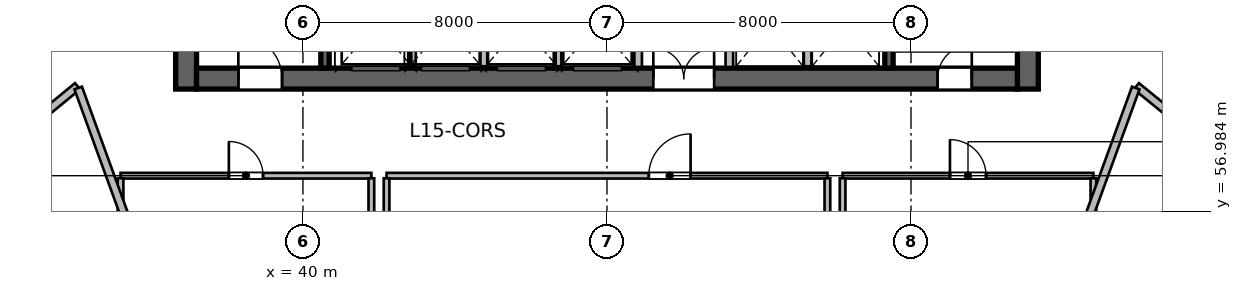
"""IFC4 building model, lengths in metres.
Left out: names, types, materials, properties, quantities, classifications, styles, units other than length and angle.
Written with IfcOpenShell. Run it as: python <this file> out.ifc"""

import sys

from ifc_helpers import new_model, si_unit, direction, frame, frame_2d, origin, place, context, subcontext, project, spatial, rectangle, extrude, source, transform, mapped, element, fill, save


model = new_model("IFC4")
c1 = context("Model", 3, precision=1e-05, world=origin(), true_north=direction((0.0, 1.0)))
c2 = subcontext(c1, "Body", "Model", "MODEL_VIEW")
j1 = project(units=[si_unit("LENGTHUNIT", "METRE"), si_unit("PLANEANGLEUNIT", "RADIAN")], contexts=[c1])
p1 = place(None, origin())
s1 = spatial("IfcSite", under=j1, at=p1, CompositionType="ELEMENT")
p2 = place(p1, origin())
s2 = spatial("IfcBuilding", under=s1, at=p2, CompositionType="ELEMENT")
p3 = place(p2, frame((0.0, 0.0, 67.8)))
s3 = spatial("IfcBuildingStorey", under=s2, at=p3, CompositionType="ELEMENT", Elevation=67.8)
m1 = source(origin(), c2, "Body", "SweptSolid", [
    extrude(rectangle(XDim=12.0, YDim=0.55, at=frame_2d((6.0, 0.0))), origin(), (0.0, 0.0, 1.0), 3.6),
])
for number, where, z_axis, x_axis in (
    (1, (36.925, 60.2, 0.0), (0.0, 0.0, 1.0), (0.0, 1.0, 0.0)),
    (2, (59.075, 60.2, 0.0), (0.0, 0.0, 1.0), (0.0, 1.0, 0.0)),
):
    element("IfcWall", number, at=place(p3, frame(where, z_axis=z_axis, x_axis=x_axis)), inside=s3, PredefinedType="SHEAR", context=c2, shape_type="MappedRepresentation", body=[
        mapped(m1, transform((0.0, 0.0, 0.0), scale=1.0)),
    ])
m2 = source(origin(), c2, "Body", "SweptSolid", [
    extrude(rectangle(XDim=21.6, YDim=0.55, at=frame_2d((10.8, 0.0))), origin(), (0.0, 0.0, 1.0), 3.6),
])
p4 = place(p3, frame((37.2, 60.475, 0.0), z_axis=(0.0, 0.0, 1.0), x_axis=(1.0, 0.0, 0.0)))
e3 = element("IfcWall", 3, at=p4, inside=s3, PredefinedType="SHEAR", context=c2, shape_type="MappedRepresentation", body=[
    mapped(m2, transform((0.0, 0.0, 0.0), scale=1.0)),
])
p5 = place(p4, frame((1.1, 0.0, 0.0)))
e4 = element("IfcOpeningElement", 4, at=p5, cuts=e3, PredefinedType="OPENING", context=c2, shape_type="SweptSolid", body=[
    extrude(rectangle(XDim=1.15, YDim=2.15, at=frame_2d((0.575, 1.075))), frame((0.0, 0.285, 0.0), z_axis=(0.0, -1.0, 0.0), x_axis=(1.0, 0.0, 0.0)), (0.0, 0.0, 1.0), 0.57),
])
p6 = place(p4, frame((19.5, 0.0, 0.0)))
e5 = element("IfcOpeningElement", 5, at=p6, cuts=e3, PredefinedType="OPENING", context=c2, shape_type="SweptSolid", body=[
    extrude(rectangle(XDim=0.9, YDim=2.1, at=frame_2d((0.45, 1.05))), frame((0.0, 0.285, 0.0), z_axis=(0.0, -1.0, 0.0), x_axis=(1.0, 0.0, 0.0)), (0.0, 0.0, 1.0), 0.57),
])
p7 = place(p4, frame((12.02, 0.0, 0.0)))
e6 = element("IfcOpeningElement", 6, at=p7, cuts=e3, PredefinedType="OPENING", context=c2, shape_type="SweptSolid", body=[
    extrude(rectangle(XDim=1.6, YDim=2.15, at=frame_2d((0.8, 1.075))), frame((0.0, 0.285, 0.0), z_axis=(0.0, -1.0, 0.0), x_axis=(1.0, 0.0, 0.0)), (0.0, 0.0, 1.0), 0.57),
])
m3 = source(origin(), c2, "Body", "SweptSolid", [
    extrude(rectangle(XDim=10.9, YDim=0.22, at=frame_2d((5.45, 0.0))), origin(), (0.0, 0.0, 1.0), 3.6),
])
p8 = place(p3, frame((40.58, 60.75, 0.0), z_axis=(0.0, 0.0, 1.0), x_axis=(0.0, 1.0, 0.0)))
e7 = element("IfcWall", 7, at=p8, inside=s3, PredefinedType="SHEAR", context=c2, shape_type="MappedRepresentation", body=[
    mapped(m3, transform((0.0, 0.0, 0.0), scale=1.0)),
])
p9 = place(p3, frame((55.42, 60.75, 0.0), z_axis=(0.0, 0.0, 1.0), x_axis=(0.0, 1.0, 0.0)))
e8 = element("IfcWall", 8, at=p9, inside=s3, PredefinedType="SHEAR", context=c2, shape_type="MappedRepresentation", body=[
    mapped(m3, transform((0.0, 0.0, 0.0), scale=1.0)),
])
p10 = place(p9, frame((9.495, 0.0, 0.0)))
e9 = element("IfcOpeningElement", 9, at=p10, cuts=e8, PredefinedType="OPENING", context=c2, shape_type="SweptSolid", body=[
    extrude(rectangle(XDim=1.15, YDim=2.15, at=frame_2d((0.575, 1.075))), frame((0.0, 0.12, 0.0), z_axis=(0.0, -1.0, 0.0), x_axis=(1.0, 0.0, 0.0)), (0.0, 0.0, 1.0), 0.24),
])
m4 = source(origin(), c2, "Body", "SweptSolid", [
    extrude(rectangle(XDim=2.24, YDim=0.2, at=frame_2d((1.12, 0.0))), origin(), (0.0, 0.0, 1.0), 3.36),
])
for number, where, z_axis, x_axis in (
    (10, (48.82, 60.78, 0.0), (0.0, 0.0, 1.0), (0.0, 1.0, 0.0)),
    (11, (51.22, 60.78, 0.0), (0.0, 0.0, 1.0), (0.0, 1.0, 0.0)),
):
    element("IfcWall", number, at=place(p3, frame(where, z_axis=z_axis, x_axis=x_axis)), inside=s3, PredefinedType="SOLIDWALL", context=c2, shape_type="MappedRepresentation", body=[
        mapped(m4, transform((0.0, 0.0, 0.0), scale=1.0)),
    ])
m5 = source(origin(), c2, "Body", "SweptSolid", [
    extrude(rectangle(XDim=2.2, YDim=0.2, at=frame_2d((1.1, 0.0))), origin(), (0.0, 0.0, 1.0), 3.36),
])
for number, where, z_axis, x_axis in (
    (12, (42.87, 60.8, 0.0), (0.0, 0.0, 1.0), (0.0, 1.0, 0.0)),
    (13, (44.77, 60.8, 0.0), (0.0, 0.0, 1.0), (0.0, 1.0, 0.0)),
    (14, (46.7, 60.8, 0.0), (0.0, 0.0, 1.0), (0.0, 1.0, 0.0)),
    (15, (53.28, 60.8, 0.0), (0.0, 0.0, 1.0), (0.0, 1.0, 0.0)),
):
    element("IfcWall", number, at=place(p3, frame(where, z_axis=z_axis, x_axis=x_axis)), inside=s3, PredefinedType="SOLIDWALL", context=c2, shape_type="MappedRepresentation", body=[
        mapped(m5, transform((0.0, 0.0, 0.0), scale=1.0)),
    ])
m6 = source(origin(), c2, "Body", "SweptSolid", [
    extrude(rectangle(XDim=6.6, YDim=0.15, at=frame_2d((3.3, 0.0))), origin(), (0.0, 0.0, 1.0), 3.36),
])
p11 = place(p3, frame((35.2, 57.92, 0.0), z_axis=(0.0, 0.0, 1.0), x_axis=(1.0, 0.0, 0.0)))
e16 = element("IfcWall", 16, at=p11, inside=s3, PredefinedType="PARTITIONING", context=c2, shape_type="MappedRepresentation", body=[
    mapped(m6, transform((0.0, 0.0, 0.0), scale=1.0)),
])
p12 = place(p11, frame((2.85, 0.0, 0.0)))
e17 = element("IfcOpeningElement", 17, at=p12, cuts=e16, PredefinedType="OPENING", context=c2, shape_type="SweptSolid", body=[
    extrude(rectangle(XDim=0.9, YDim=2.1, at=frame_2d((0.45, 1.05))), frame((0.0, 0.085, 0.0), z_axis=(0.0, -1.0, 0.0), x_axis=(1.0, 0.0, 0.0)), (0.0, 0.0, 1.0), 0.17),
])
m7 = source(origin(), c2, "Body", "SweptSolid", [
    extrude(rectangle(XDim=3.785, YDim=0.15, at=frame_2d((1.893, 0.0))), origin(), (0.0, 0.0, 1.0), 3.36),
])
for number, where, z_axis, x_axis in (
    (18, (35.2, 54.067, 0.0), (0.0, 0.0, 1.0), (0.0, 1.0, 0.0)),
    (19, (41.8, 54.067, 0.0), (0.0, 0.0, 1.0), (0.0, 1.0, 0.0)),
):
    element("IfcWall", number, at=place(p3, frame(where, z_axis=z_axis, x_axis=x_axis)), inside=s3, PredefinedType="PARTITIONING", context=c2, shape_type="MappedRepresentation", body=[
        mapped(m7, transform((0.0, 0.0, 0.0), scale=1.0)),
    ])
m8 = source(origin(), c2, "Body", "SweptSolid", [
    extrude(rectangle(XDim=11.6, YDim=0.15, at=frame_2d((5.8, 0.0))), origin(), (0.0, 0.0, 1.0), 3.36),
])
p13 = place(p3, frame((42.2, 57.92, 0.0), z_axis=(0.0, 0.0, 1.0), x_axis=(1.0, 0.0, 0.0)))
e20 = element("IfcWall", 20, at=p13, inside=s3, PredefinedType="PARTITIONING", context=c2, shape_type="MappedRepresentation", body=[
    mapped(m8, transform((0.0, 0.0, 0.0), scale=1.0)),
])
p14 = place(p13, frame((6.9, 0.0, 0.0)))
e21 = element("IfcOpeningElement", 21, at=p14, cuts=e20, PredefinedType="OPENING", context=c2, shape_type="SweptSolid", body=[
    extrude(rectangle(XDim=1.1, YDim=2.15, at=frame_2d((0.55, 1.075))), frame((0.0, 0.085, 0.0), z_axis=(0.0, -1.0, 0.0), x_axis=(1.0, 0.0, 0.0)), (0.0, 0.0, 1.0), 0.17),
])
for number, where, z_axis, x_axis in (
    (22, (42.2, 54.067, 0.0), (0.0, 0.0, 1.0), (0.0, 1.0, 0.0)),
    (23, (53.8, 54.067, 0.0), (0.0, 0.0, 1.0), (0.0, 1.0, 0.0)),
):
    element("IfcWall", number, at=place(p3, frame(where, z_axis=z_axis, x_axis=x_axis)), inside=s3, PredefinedType="PARTITIONING", context=c2, shape_type="MappedRepresentation", body=[
        mapped(m7, transform((0.0, 0.0, 0.0), scale=1.0)),
    ])
p15 = place(p3, frame((54.2, 57.92, 0.0), z_axis=(0.0, 0.0, 1.0), x_axis=(1.0, 0.0, 0.0)))
e24 = element("IfcWall", 24, at=p15, inside=s3, PredefinedType="PARTITIONING", context=c2, shape_type="MappedRepresentation", body=[
    mapped(m6, transform((0.0, 0.0, 0.0), scale=1.0)),
])
p16 = place(p15, frame((2.825, 0.0, 0.0)))
e25 = element("IfcOpeningElement", 25, at=p16, cuts=e24, PredefinedType="OPENING", context=c2, shape_type="SweptSolid", body=[
    extrude(rectangle(XDim=0.95, YDim=2.1, at=frame_2d((0.475, 1.05))), frame((0.0, 0.085, 0.0), z_axis=(0.0, -1.0, 0.0), x_axis=(1.0, 0.0, 0.0)), (0.0, 0.0, 1.0), 0.17),
])
for number, where, z_axis, x_axis in (
    (26, (54.2, 54.067, 0.0), (0.0, 0.0, 1.0), (0.0, 1.0, 0.0)),
    (27, (60.8, 54.067, 0.0), (0.0, 0.0, 1.0), (0.0, 1.0, 0.0)),
):
    element("IfcWall", number, at=place(p3, frame(where, z_axis=z_axis, x_axis=x_axis)), inside=s3, PredefinedType="PARTITIONING", context=c2, shape_type="MappedRepresentation", body=[
        mapped(m7, transform((0.0, 0.0, 0.0), scale=1.0)),
    ])
m9 = source(origin(), c2, "Body", "SweptSolid", [
    extrude(rectangle(XDim=6.721, YDim=0.21, at=frame_2d((3.361, 0.0))), origin(), (0.0, 0.0, 1.0), 3.36),
])
p17 = place(p3, frame((28.874, 56.01, 0.0), z_axis=(0.0, 0.0, 1.0), x_axis=(0.772828051199, 0.63461547671, 0.0)))
e28 = element("IfcWall", 28, at=p17, inside=s3, PredefinedType="PARTITIONING", context=c2, shape_type="MappedRepresentation", body=[
    mapped(m9, transform((0.0, 0.0, 0.0), scale=1.0)),
])
m10 = source(origin(), c2, "Body", "SweptSolid", [
    extrude(rectangle(XDim=12.196, YDim=0.21, at=frame_2d((6.098, 0.0))), origin(), (0.0, 0.0, 1.0), 3.36),
])
p18 = place(p3, frame((38.258, 48.766, 0.0), z_axis=(0.0, 0.0, 1.0), x_axis=(-0.342022711534, 0.939691686031, 0.0)))
e29 = element("IfcWall", 29, at=p18, inside=s3, PredefinedType="PARTITIONING", context=c2, shape_type="MappedRepresentation", body=[
    mapped(m10, transform((0.0, 0.0, 0.0), scale=1.0)),
])
m11 = source(origin(), c2, "Body", "SweptSolid", [
    extrude(rectangle(XDim=6.408, YDim=0.21, at=frame_2d((3.204, 0.0))), origin(), (0.0, 0.0, 1.0), 3.36),
])
p19 = place(p3, frame((61.931, 60.275, 0.0), z_axis=(0.0, 0.0, 1.0), x_axis=(0.775878552904, -0.630882295792, 0.0)))
e30 = element("IfcWall", 30, at=p19, inside=s3, PredefinedType="PARTITIONING", context=c2, shape_type="MappedRepresentation", body=[
    mapped(m11, transform((0.0, 0.0, 0.0), scale=1.0)),
])
p20 = place(p19, frame((1.063, 0.0, 0.0)))
e31 = element("IfcOpeningElement", 31, at=p20, cuts=e30, PredefinedType="OPENING", context=c2, shape_type="SweptSolid", body=[
    extrude(rectangle(XDim=0.95, YDim=2.15, at=frame_2d((0.475, 1.075))), frame((0.0, 0.115, 0.0), z_axis=(0.0, -1.0, 0.0), x_axis=(1.0, 0.0, 0.0)), (0.0, 0.0, 1.0), 0.23),
])
p21 = place(p3, frame((57.742, 48.766, 0.0), z_axis=(0.0, 0.0, 1.0), x_axis=(0.342022711534, 0.939691686031, 0.0)))
e32 = element("IfcWall", 32, at=p21, inside=s3, PredefinedType="PARTITIONING", context=c2, shape_type="MappedRepresentation", body=[
    mapped(m10, transform((0.0, 0.0, 0.0), scale=1.0)),
])
m12 = source(origin(), c2, "Body", "SweptSolid", [
    extrude(rectangle(XDim=1.15, YDim=2.15, at=frame_2d((0.575, 1.075))), frame((0.0, 0.025, 0.0), z_axis=(0.0, -1.0, 0.0), x_axis=(1.0, 0.0, 0.0)), (0.0, 0.0, 1.0), 0.05),
])
p22 = place(p5, origin())
e33 = element("IfcDoor", 33, at=p22, inside=s3, OperationType="SINGLE_SWING_LEFT", PredefinedType="DOOR", context=c2, shape_type="MappedRepresentation", body=[
    mapped(m12, transform((0.0, 0.0, 0.0), scale=1.0)),
])
fill(e4, e33)
m13 = source(origin(), c2, "Body", "SweptSolid", [
    extrude(rectangle(XDim=0.9, YDim=2.1, at=frame_2d((0.45, 1.05))), frame((0.0, 0.025, 0.0), z_axis=(0.0, -1.0, 0.0), x_axis=(1.0, 0.0, 0.0)), (0.0, 0.0, 1.0), 0.05),
])
p23 = place(p6, origin())
e34 = element("IfcDoor", 34, at=p23, inside=s3, OperationType="SINGLE_SWING_RIGHT", PredefinedType="DOOR", context=c2, shape_type="MappedRepresentation", body=[
    mapped(m13, transform((0.0, 0.0, 0.0), scale=1.0)),
])
fill(e5, e34)
m14 = source(origin(), c2, "Body", "SweptSolid", [
    extrude(rectangle(XDim=1.6, YDim=2.15, at=frame_2d((0.8, 1.075))), frame((0.0, 0.025, 0.0), z_axis=(0.0, -1.0, 0.0), x_axis=(1.0, 0.0, 0.0)), (0.0, 0.0, 1.0), 0.05),
])
p24 = place(p7, origin())
e35 = element("IfcDoor", 35, at=p24, inside=s3, OperationType="DOUBLE_DOOR_SINGLE_SWING", PredefinedType="DOOR", context=c2, shape_type="MappedRepresentation", body=[
    mapped(m14, transform((0.0, 0.0, 0.0), scale=1.0)),
])
fill(e6, e35)
p25 = place(p12, origin())
e36 = element("IfcDoor", 36, at=p25, inside=s3, OperationType="SINGLE_SWING_LEFT", PredefinedType="DOOR", context=c2, shape_type="MappedRepresentation", body=[
    mapped(m13, transform((0.0, 0.0, 0.0), scale=1.0)),
])
fill(e17, e36)
m15 = source(origin(), c2, "Body", "SweptSolid", [
    extrude(rectangle(XDim=1.1, YDim=2.15, at=frame_2d((0.55, 1.075))), frame((0.0, 0.025, 0.0), z_axis=(0.0, -1.0, 0.0), x_axis=(1.0, 0.0, 0.0)), (0.0, 0.0, 1.0), 0.05),
])
p26 = place(p14, origin())
e37 = element("IfcDoor", 37, at=p26, inside=s3, OperationType="SINGLE_SWING_RIGHT", PredefinedType="DOOR", context=c2, shape_type="MappedRepresentation", body=[
    mapped(m15, transform((0.0, 0.0, 0.0), scale=1.0)),
])
fill(e21, e37)
m16 = source(origin(), c2, "Body", "SweptSolid", [
    extrude(rectangle(XDim=0.95, YDim=2.1, at=frame_2d((0.475, 1.05))), frame((0.0, 0.025, 0.0), z_axis=(0.0, -1.0, 0.0), x_axis=(1.0, 0.0, 0.0)), (0.0, 0.0, 1.0), 0.05),
])
p27 = place(p16, origin())
e38 = element("IfcDoor", 38, at=p27, inside=s3, OperationType="SINGLE_SWING_LEFT", PredefinedType="DOOR", context=c2, shape_type="MappedRepresentation", body=[
    mapped(m16, transform((0.0, 0.0, 0.0), scale=1.0)),
])
fill(e25, e38)
save(model, sys.argv[1])
